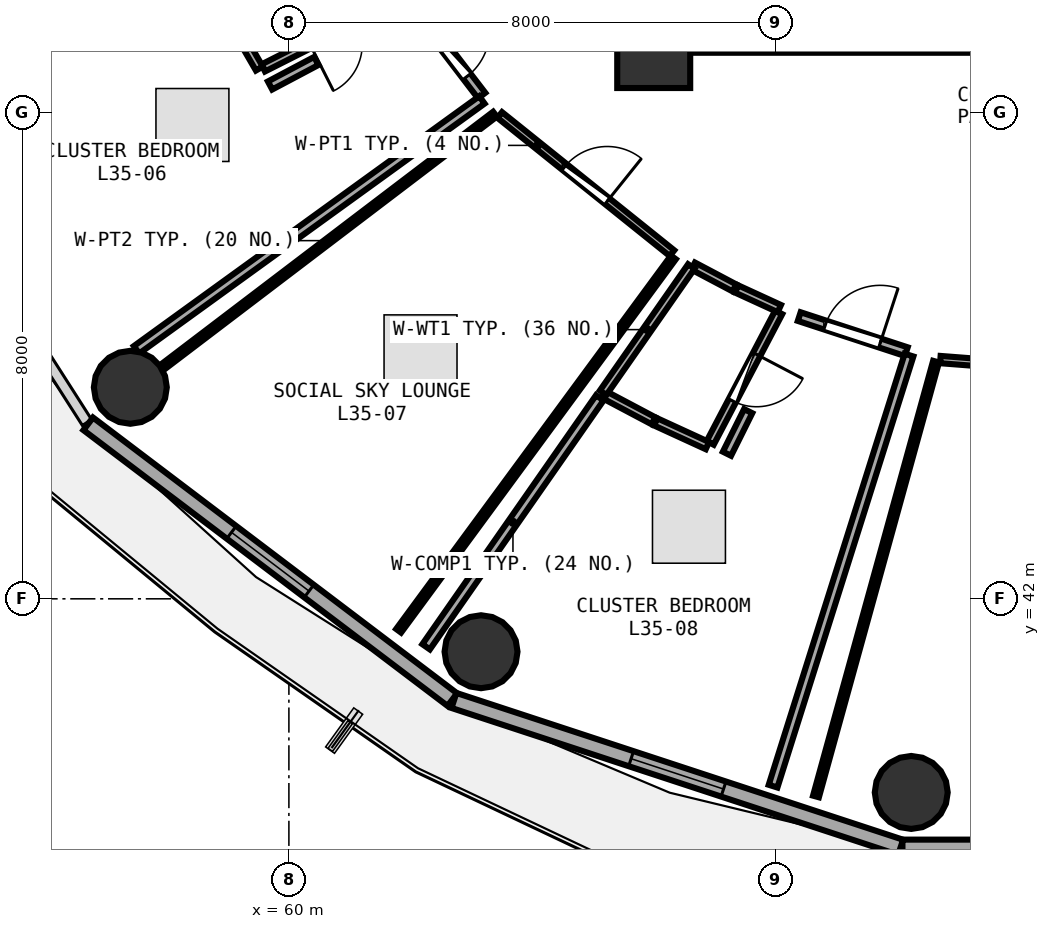
"""IFC4 building model, lengths in metres.
Left out: names, types, materials, properties, quantities, classifications, styles, units other than length and angle.
Written with IfcOpenShell. Run it as: python <this file> out.ifc"""

import sys

from ifc_helpers import new_model, si_unit, direction, frame, frame_2d, origin, origin_2d, place, context, subcontext, project, spatial, rectangle, circle, extrude, element, fill, save


model = new_model("IFC4")
c1 = context("Model", 3, precision=1e-05, world=origin(), true_north=direction((0.0, 1.0)))
c2 = subcontext(c1, "Body", "Model", "MODEL_VIEW")
j1 = project(units=[si_unit("LENGTHUNIT", "METRE"), si_unit("PLANEANGLEUNIT", "RADIAN")], contexts=[c1])
p1 = place(None, origin())
s1 = spatial("IfcSite", under=j1, at=p1, CompositionType="ELEMENT")
p2 = place(p1, origin())
s2 = spatial("IfcBuilding", under=s1, at=p2, CompositionType="ELEMENT")
p3 = place(p2, frame((0.0, 0.0, 139.35)))
s3 = spatial("IfcBuildingStorey", under=s2, at=p3, CompositionType="ELEMENT", Elevation=139.35)
p4 = place(p3, frame((66.0, 51.0, 0.0), z_axis=(0.0, 0.0, 1.0), x_axis=(1.0, 0.0, 0.0)))
e1 = element("IfcColumn", 1, at=p4, inside=s3, PredefinedType="PILASTER", context=c2, shape_type="SweptSolid", body=[
    extrude(rectangle(XDim=1.2, YDim=1.2, at=origin_2d()), origin(), (0.0, 0.0, 1.0), 3.75),
])
for number, where, z_axis, x_axis in (
    (2, (57.392, 45.479, 0.0), (0.0, 0.0, 1.0), (1.0, 0.0, 0.0)),
    (3, (63.16, 41.13, 0.0), (0.0, 0.0, 1.0), (1.0, 0.0, 0.0)),
    (4, (70.235, 38.816, 0.0), (0.0, 0.0, 1.0), (1.0, 0.0, 0.0)),
):
    element("IfcColumn", number, at=place(p3, frame(where, z_axis=z_axis, x_axis=x_axis)), inside=s3, PredefinedType="COLUMN", context=c2, shape_type="SweptSolid", body=[
        extrude(circle(Radius=0.6, at=origin_2d()), origin(), (0.0, 0.0, 1.0), 3.75),
    ])
p5 = place(p3, frame((56.699, 44.878, 0.0), z_axis=(0.0, 0.0, 1.0), x_axis=(0.797163719609, -0.603763202042, 0.0)))
e5 = element("IfcWall", 5, at=p5, inside=s3, PredefinedType="SOLIDWALL", context=c2, shape_type="SweptSolid", body=[
    extrude(rectangle(XDim=7.512, YDim=0.26, at=frame_2d((3.756, 0.0))), origin(), (0.0, 0.0, 1.0), 3.475),
])
p6 = place(p5, frame((2.956, 0.0, 0.85)))
e6 = element("IfcOpeningElement", 6, at=p6, cuts=e5, PredefinedType="OPENING", context=c2, shape_type="SweptSolid", body=[
    extrude(rectangle(XDim=1.6, YDim=1.45, at=frame_2d((0.8, 0.725))), frame((0.0, 0.14, 0.0), z_axis=(0.0, -1.0, 0.0), x_axis=(1.0, 0.0, 0.0)), (0.0, 0.0, 1.0), 0.28),
])
p7 = place(p3, frame((62.714, 40.328, 0.0), z_axis=(0.0, 0.0, 1.0), x_axis=(0.950038302428, -0.312133343173, 0.0)))
e7 = element("IfcWall", 7, at=p7, inside=s3, PredefinedType="SOLIDWALL", context=c2, shape_type="SweptSolid", body=[
    extrude(rectangle(XDim=7.733, YDim=0.26, at=frame_2d((3.867, 0.0))), origin(), (0.0, 0.0, 1.0), 3.475),
])
p8 = place(p7, frame((3.067, 0.0, 0.85)))
e8 = element("IfcOpeningElement", 8, at=p8, cuts=e7, PredefinedType="OPENING", context=c2, shape_type="SweptSolid", body=[
    extrude(rectangle(XDim=1.6, YDim=1.45, at=frame_2d((0.8, 0.725))), frame((0.0, 0.14, 0.0), z_axis=(0.0, -1.0, 0.0), x_axis=(1.0, 0.0, 0.0)), (0.0, 0.0, 1.0), 0.28),
])
p9 = place(p3, frame((70.091, 37.91, 0.0), z_axis=(0.0, 0.0, 1.0), x_axis=(1.0, 0.0, 0.0)))
e9 = element("IfcWall", 9, at=p9, inside=s3, PredefinedType="SOLIDWALL", context=c2, shape_type="SweptSolid", body=[
    extrude(rectangle(XDim=7.819, YDim=0.26, at=frame_2d((3.909, 0.0))), origin(), (0.0, 0.0, 1.0), 3.475),
])
p10 = place(p9, frame((3.434, 0.0, 0.0)))
e10 = element("IfcOpeningElement", 10, at=p10, cuts=e9, PredefinedType="OPENING", context=c2, shape_type="SweptSolid", body=[
    extrude(rectangle(XDim=0.95, YDim=2.1, at=frame_2d((0.475, 1.05))), frame((0.0, 0.14, 0.0), z_axis=(0.0, -1.0, 0.0), x_axis=(1.0, 0.0, 0.0)), (0.0, 0.0, 1.0), 0.28),
])
p11 = place(p9, frame((4.734, 0.0, 0.85)))
e11 = element("IfcOpeningElement", 11, at=p11, cuts=e9, PredefinedType="OPENING", context=c2, shape_type="SweptSolid", body=[
    extrude(rectangle(XDim=1.2, YDim=1.45, at=frame_2d((0.6, 0.725))), frame((0.0, 0.14, 0.0), z_axis=(0.0, -1.0, 0.0), x_axis=(1.0, 0.0, 0.0)), (0.0, 0.0, 1.0), 0.28),
])
p12 = place(p3, frame((66.26, 51.08, 0.0), z_axis=(0.0, 0.0, 1.0), x_axis=(1.0, 0.0, 0.0)))
e12 = element("IfcWall", 12, at=p12, inside=s3, PredefinedType="SHEAR", context=c2, shape_type="SweptSolid", body=[
    extrude(rectangle(XDim=7.16, YDim=0.2, at=frame_2d((3.58, 0.0))), origin(), (0.0, 0.0, 1.0), 3.49),
])
p13 = place(p3, frame((70.714, 45.934, 0.0), z_axis=(0.0, 0.0, 1.0), x_axis=(0.99702766625, -0.077044355613, 0.0)))
e13 = element("IfcWall", 13, at=p13, inside=s3, PredefinedType="PARTITIONING", context=c2, shape_type="SweptSolid", body=[
    extrude(rectangle(XDim=4.24, YDim=0.12, at=frame_2d((2.12, 0.0))), origin(), (0.0, 0.0, 1.0), 2.975),
])
p14 = place(p13, frame((1.67, 0.0, 0.0)))
e14 = element("IfcOpeningElement", 14, at=p14, cuts=e13, PredefinedType="OPENING", context=c2, shape_type="SweptSolid", body=[
    extrude(rectangle(XDim=0.9, YDim=2.08, at=frame_2d((0.45, 1.04))), frame((0.0, 0.07, 0.0), z_axis=(0.0, -1.0, 0.0), x_axis=(1.0, 0.0, 0.0)), (0.0, 0.0, 1.0), 0.14),
])
p15 = place(p3, frame((61.883, 51.895, 0.0), z_axis=(0.0, 0.0, 1.0), x_axis=(-0.892490597906, -0.451065995891, 0.0)))
e15 = element("IfcWall", 15, at=p15, inside=s3, PredefinedType="PLUMBINGWALL", context=c2, shape_type="SweptSolid", body=[
    extrude(rectangle(XDim=2.583, YDim=0.13, at=frame_2d((1.292, 0.0))), origin(), (0.0, 0.0, 1.0), 2.975),
])
p16 = place(p15, frame((0.861, 0.0, 0.0)))
e16 = element("IfcOpeningElement", 16, at=p16, cuts=e15, PredefinedType="OPENING", context=c2, shape_type="SweptSolid", body=[
    extrude(rectangle(XDim=0.86, YDim=2.05, at=frame_2d((0.43, 1.025))), frame((0.0, 0.075, 0.0), z_axis=(0.0, -1.0, 0.0), x_axis=(1.0, 0.0, 0.0)), (0.0, 0.0, 1.0), 0.15),
])
p17 = place(p3, frame((62.111, 51.658, 0.0), z_axis=(0.0, 0.0, 1.0), x_axis=(0.608307977949, -0.793701079729, 0.0)))
e17 = element("IfcWall", 17, at=p17, inside=s3, PredefinedType="PARTITIONING", context=c2, shape_type="SweptSolid", body=[
    extrude(rectangle(XDim=1.742, YDim=0.15, at=frame_2d((0.871, 0.0))), origin(), (0.0, 0.0, 1.0), 2.975),
])
p18 = place(p17, frame((0.396, 0.0, 0.0)))
e18 = element("IfcOpeningElement", 18, at=p18, cuts=e17, PredefinedType="OPENING", context=c2, shape_type="SweptSolid", body=[
    extrude(rectangle(XDim=0.95, YDim=2.08, at=frame_2d((0.475, 1.04))), frame((0.0, 0.085, 0.0), z_axis=(0.0, -1.0, 0.0), x_axis=(1.0, 0.0, 0.0)), (0.0, 0.0, 1.0), 0.17),
])
p19 = place(p3, frame((63.468, 49.957, 0.0), z_axis=(0.0, 0.0, 1.0), x_axis=(0.78006790059, -0.625694870099, 0.0)))
e19 = element("IfcWall", 19, at=p19, inside=s3, PredefinedType="PARTITIONING", context=c2, shape_type="SweptSolid", body=[
    extrude(rectangle(XDim=3.631, YDim=0.12, at=frame_2d((1.815, 0.0))), origin(), (0.0, 0.0, 1.0), 2.975),
])
p20 = place(p19, frame((1.366, 0.0, 0.0)))
e20 = element("IfcOpeningElement", 20, at=p20, cuts=e19, PredefinedType="OPENING", context=c2, shape_type="SweptSolid", body=[
    extrude(rectangle(XDim=0.9, YDim=2.08, at=frame_2d((0.45, 1.04))), frame((0.0, 0.07, 0.0), z_axis=(0.0, -1.0, 0.0), x_axis=(1.0, 0.0, 0.0)), (0.0, 0.0, 1.0), 0.14),
])
p21 = place(p3, frame((68.056, 46.712, 0.0), z_axis=(0.0, 0.0, 1.0), x_axis=(-0.464721454244, -0.885456927222, 0.0)))
e21 = element("IfcWall", 21, at=p21, inside=s3, PredefinedType="PLUMBINGWALL", context=c2, shape_type="SweptSolid", body=[
    extrude(rectangle(XDim=2.426, YDim=0.13, at=frame_2d((1.213, 0.0))), origin(), (0.0, 0.0, 1.0), 3.175),
])
p22 = place(p21, frame((0.783, 0.0, 0.0)))
e22 = element("IfcOpeningElement", 22, at=p22, cuts=e21, PredefinedType="OPENING", context=c2, shape_type="SweptSolid", body=[
    extrude(rectangle(XDim=0.86, YDim=2.05, at=frame_2d((0.43, 1.025))), frame((0.0, 0.075, 0.0), z_axis=(0.0, -1.0, 0.0), x_axis=(1.0, 0.0, 0.0)), (0.0, 0.0, 1.0), 0.15),
])
p23 = place(p3, frame((68.393, 46.641, 0.0), z_axis=(0.0, 0.0, 1.0), x_axis=(0.950343295829, -0.311203502668, 0.0)))
e23 = element("IfcWall", 23, at=p23, inside=s3, PredefinedType="PARTITIONING", context=c2, shape_type="SweptSolid", body=[
    extrude(rectangle(XDim=1.853, YDim=0.15, at=frame_2d((0.927, 0.0))), origin(), (0.0, 0.0, 1.0), 3.48),
])
p24 = place(p23, frame((0.451, 0.0, 0.0)))
e24 = element("IfcOpeningElement", 24, at=p24, cuts=e23, PredefinedType="OPENING", context=c2, shape_type="SweptSolid", body=[
    extrude(rectangle(XDim=0.95, YDim=2.08, at=frame_2d((0.475, 1.04))), frame((0.0, 0.085, 0.0), z_axis=(0.0, -1.0, 0.0), x_axis=(1.0, 0.0, 0.0)), (0.0, 0.0, 1.0), 0.17),
])
p25 = place(p3, frame((68.669, 38.75, 0.0), z_axis=(0.0, 0.0, 1.0), x_axis=(0.26617364863, 0.963925095002, 0.0)))
e25 = element("IfcWall", 25, at=p25, inside=s3, PredefinedType="PARTITIONING", context=c2, shape_type="SweptSolid", body=[
    extrude(rectangle(XDim=7.418, YDim=0.1, at=frame_2d((3.709, 0.0))), origin(), (0.0, 0.0, 1.0), 3.025),
])
p26 = place(p3, frame((59.514, 50.72, 0.0), z_axis=(0.0, 0.0, 1.0), x_axis=(-0.501222652689, 0.865318353227, 0.0)))
e26 = element("IfcWall", 26, at=p26, inside=s3, PredefinedType="PLUMBINGWALL", context=c2, shape_type="SweptSolid", body=[
    extrude(rectangle(XDim=0.878, YDim=0.13, at=frame_2d((0.439, 0.0))), origin(), (0.0, 0.0, 1.0), 2.975),
])
p27 = place(p3, frame((63.175, 50.205, 0.0), z_axis=(0.0, 0.0, 1.0), x_axis=(-0.810227225477, -0.586115895618, 0.0)))
e27 = element("IfcWall", 27, at=p27, inside=s3, PredefinedType="PARTITIONING", context=c2, shape_type="SweptSolid", body=[
    extrude(rectangle(XDim=7.011, YDim=0.15, at=frame_2d((3.506, 0.0))), origin(), (0.0, 0.0, 1.0), 3.175),
])
p28 = place(p3, frame((53.624, 50.438, 0.0), z_axis=(0.0, 0.0, 1.0), x_axis=(0.937175901168, 0.348857177468, 0.0)))
e28 = element("IfcWall", 28, at=p28, inside=s3, PredefinedType="PARTITIONING", context=c2, shape_type="SweptSolid", body=[
    extrude(rectangle(XDim=5.292, YDim=0.15, at=frame_2d((2.646, 0.0))), origin(), (0.0, 0.0, 1.0), 2.975),
])
p29 = place(p3, frame((59.69, 50.442, 0.0), z_axis=(0.0, 0.0, 1.0), x_axis=(0.883456769574, 0.468512685308, 0.0)))
e29 = element("IfcWall", 29, at=p29, inside=s3, PredefinedType="PARTITIONING", context=c2, shape_type="SweptSolid", body=[
    extrude(rectangle(XDim=0.861, YDim=0.15, at=frame_2d((0.431, 0.0))), origin(), (0.0, 0.0, 1.0), 3.48),
])
p30 = place(p3, frame((66.323, 47.615, 0.0), z_axis=(0.0, 0.0, 1.0), x_axis=(-0.592678959784, -0.805438793845, 0.0)))
e30 = element("IfcWall", 30, at=p30, inside=s3, PredefinedType="PARTITIONING", context=c2, shape_type="SweptSolid", body=[
    extrude(rectangle(XDim=7.624, YDim=0.1, at=frame_2d((3.812, 0.0))), origin(), (0.0, 0.0, 1.0), 2.975),
])
p31 = place(p3, frame((57.921, 45.811, 0.0), z_axis=(0.0, 0.0, 1.0), x_axis=(0.79595600815, 0.60535446896, 0.0)))
e31 = element("IfcWall", 31, at=p31, inside=s3, PredefinedType="PARTITIONING", context=c2, shape_type="SweptSolid", body=[
    extrude(rectangle(XDim=6.869, YDim=0.1, at=frame_2d((3.435, 0.0))), origin(), (0.0, 0.0, 1.0), 2.975),
])
p32 = place(p3, frame((66.648, 47.473, 0.0), z_axis=(0.0, 0.0, 1.0), x_axis=(0.884034960309, -0.467420783611, 0.0)))
e32 = element("IfcWall", 32, at=p32, inside=s3, PredefinedType="PLUMBINGWALL", context=c2, shape_type="SweptSolid", body=[
    extrude(rectangle(XDim=0.769, YDim=0.13, at=frame_2d((0.384, 0.0))), origin(), (0.0, 0.0, 1.0), 3.235),
])
p33 = place(p3, frame((67.363, 47.096, 0.0), z_axis=(0.0, 0.0, 1.0), x_axis=(0.908835433781, -0.417154832531, 0.0)))
e33 = element("IfcWall", 33, at=p33, inside=s3, PredefinedType="PLUMBINGWALL", context=c2, shape_type="SweptSolid", body=[
    extrude(rectangle(XDim=0.773, YDim=0.13, at=frame_2d((0.387, 0.0))), origin(), (0.0, 0.0, 1.0), 3.235),
])
p34 = place(p3, frame((66.883, 44.519, 0.0), z_axis=(0.0, 0.0, 1.0), x_axis=(-0.90885062215, 0.417121740763, 0.0)))
e34 = element("IfcWall", 34, at=p34, inside=s3, PredefinedType="PLUMBINGWALL", context=c2, shape_type="SweptSolid", body=[
    extrude(rectangle(XDim=0.936, YDim=0.13, at=frame_2d((0.468, 0.0))), origin(), (0.0, 0.0, 1.0), 3.175),
])
p35 = place(p3, frame((65.996, 44.927, 0.0), z_axis=(0.0, 0.0, 1.0), x_axis=(-0.88373041627, 0.46799631554, 0.0)))
e35 = element("IfcWall", 35, at=p35, inside=s3, PredefinedType="PLUMBINGWALL", context=c2, shape_type="SweptSolid", body=[
    extrude(rectangle(XDim=0.93, YDim=0.13, at=frame_2d((0.465, 0.0))), origin(), (0.0, 0.0, 1.0), 3.175),
])
p36 = place(p3, frame((65.168, 45.388, 0.0), z_axis=(0.0, 0.0, 1.0), x_axis=(0.572452908282, 0.819937599943, 0.0)))
e36 = element("IfcWall", 36, at=p36, inside=s3, PredefinedType="PLUMBINGWALL", context=c2, shape_type="SweptSolid", body=[
    extrude(rectangle(XDim=2.533, YDim=0.13, at=frame_2d((1.267, 0.0))), origin(), (0.0, 0.0, 1.0), 3.235),
])
p37 = place(p3, frame((70.199, 46.008, 0.0), z_axis=(0.0, 0.0, 1.0), x_axis=(-0.300834252316, -0.953676440222, 0.0)))
e37 = element("IfcWall", 37, at=p37, inside=s3, PredefinedType="PARTITIONING", context=c2, shape_type="SweptSolid", body=[
    extrude(rectangle(XDim=7.433, YDim=0.15, at=frame_2d((3.716, 0.0))), origin(), (0.0, 0.0, 1.0), 3.025),
])
p38 = place(p3, frame((62.257, 41.211, 0.0), z_axis=(0.0, 0.0, 1.0), x_axis=(0.572125752908, 0.820165911789, 0.0)))
e38 = element("IfcWall", 38, at=p38, inside=s3, PredefinedType="PARTITIONING", context=c2, shape_type="SweptSolid", body=[
    extrude(rectangle(XDim=4.992, YDim=0.15, at=frame_2d((2.496, 0.0))), origin(), (0.0, 0.0, 1.0), 2.975),
])
p39 = place(p3, frame((67.205, 44.386, 0.0), z_axis=(0.0, 0.0, 1.0), x_axis=(0.445215718224, 0.89542334359, 0.0)))
e39 = element("IfcWall", 39, at=p39, inside=s3, PredefinedType="PARTITIONING", context=c2, shape_type="SweptSolid", body=[
    extrude(rectangle(XDim=0.782, YDim=0.15, at=frame_2d((0.391, 0.0))), origin(), (0.0, 0.0, 1.0), 3.175),
])
p40 = place(p6, origin())
e40 = element("IfcWindow", 40, at=p40, inside=s3, PartitioningType="SINGLE_PANEL", PredefinedType="WINDOW", context=c2, shape_type="SweptSolid", body=[
    extrude(rectangle(XDim=1.6, YDim=1.45, at=frame_2d((0.8, 0.725))), frame((0.0, 0.03, 0.0), z_axis=(0.0, -1.0, 0.0), x_axis=(1.0, 0.0, 0.0)), (0.0, 0.0, 1.0), 0.06),
])
fill(e6, e40)
p41 = place(p8, origin())
e41 = element("IfcWindow", 41, at=p41, inside=s3, PartitioningType="SINGLE_PANEL", PredefinedType="WINDOW", context=c2, shape_type="SweptSolid", body=[
    extrude(rectangle(XDim=1.6, YDim=1.45, at=frame_2d((0.8, 0.725))), frame((0.0, 0.03, 0.0), z_axis=(0.0, -1.0, 0.0), x_axis=(1.0, 0.0, 0.0)), (0.0, 0.0, 1.0), 0.06),
])
fill(e8, e41)
p42 = place(p18, origin())
e42 = element("IfcDoor", 42, at=p42, inside=s3, OperationType="SINGLE_SWING_LEFT", PredefinedType="DOOR", context=c2, shape_type="SweptSolid", body=[
    extrude(rectangle(XDim=0.95, YDim=2.08, at=frame_2d((0.475, 1.04))), frame((0.0, 0.025, 0.0), z_axis=(0.0, -1.0, 0.0), x_axis=(1.0, 0.0, 0.0)), (0.0, 0.0, 1.0), 0.05),
])
fill(e18, e42)
p43 = place(p20, origin())
e43 = element("IfcDoor", 43, at=p43, inside=s3, OperationType="SINGLE_SWING_RIGHT", PredefinedType="DOOR", context=c2, shape_type="SweptSolid", body=[
    extrude(rectangle(XDim=0.9, YDim=2.08, at=frame_2d((0.45, 1.04))), frame((0.0, 0.025, 0.0), z_axis=(0.0, -1.0, 0.0), x_axis=(1.0, 0.0, 0.0)), (0.0, 0.0, 1.0), 0.05),
])
fill(e20, e43)
p44 = place(p22, origin())
e44 = element("IfcDoor", 44, at=p44, inside=s3, OperationType="SINGLE_SWING_LEFT", PredefinedType="DOOR", context=c2, shape_type="SweptSolid", body=[
    extrude(rectangle(XDim=0.86, YDim=2.05, at=frame_2d((0.43, 1.025))), frame((0.0, 0.025, 0.0), z_axis=(0.0, -1.0, 0.0), x_axis=(1.0, 0.0, 0.0)), (0.0, 0.0, 1.0), 0.05),
])
fill(e22, e44)
p45 = place(p24, origin())
e45 = element("IfcDoor", 45, at=p45, inside=s3, OperationType="SINGLE_SWING_RIGHT", PredefinedType="DOOR", context=c2, shape_type="SweptSolid", body=[
    extrude(rectangle(XDim=0.95, YDim=2.08, at=frame_2d((0.475, 1.04))), frame((0.0, 0.025, 0.0), z_axis=(0.0, -1.0, 0.0), x_axis=(1.0, 0.0, 0.0)), (0.0, 0.0, 1.0), 0.05),
])
fill(e24, e45)
save(model, sys.argv[1])
